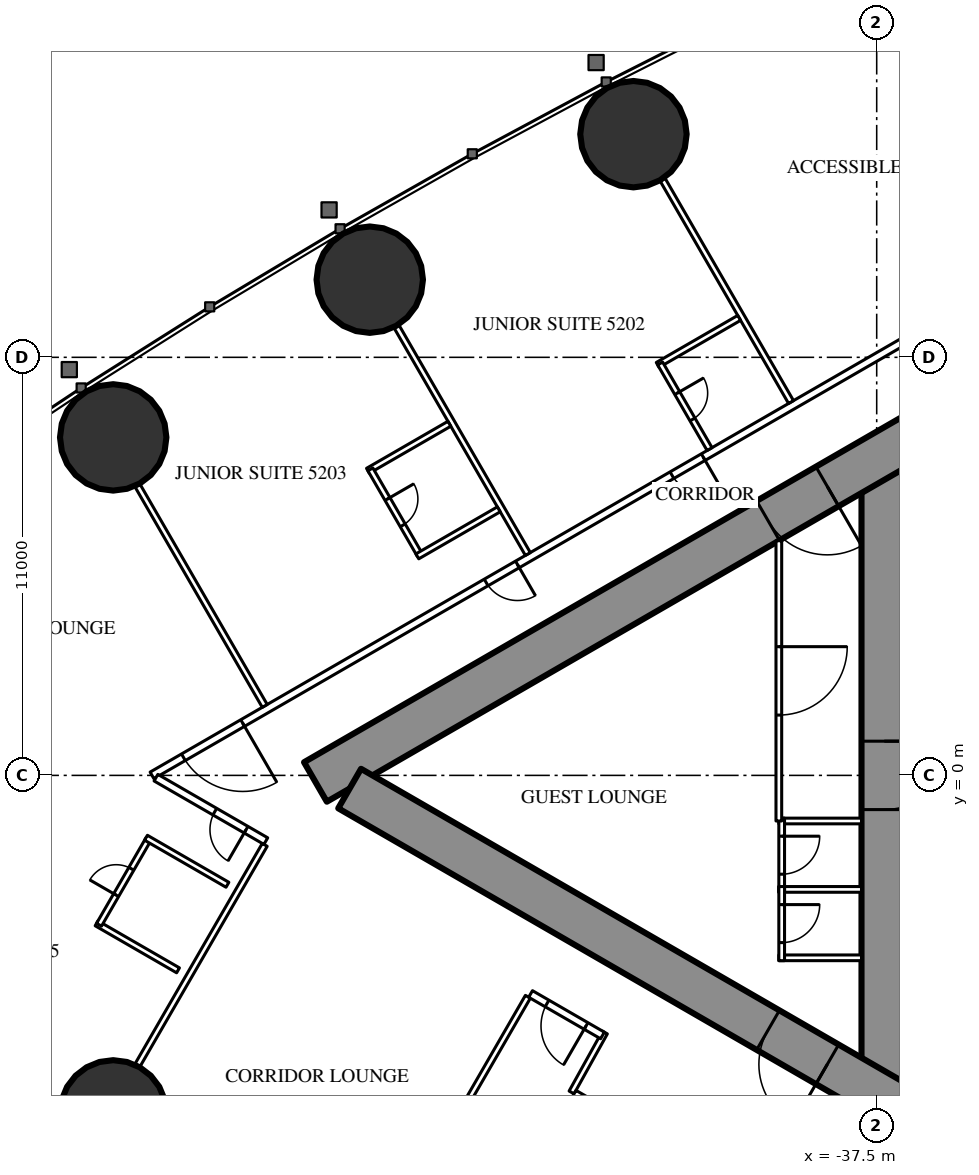
"""IFC4 building model, lengths in metres.
Left out: names, types, materials, properties, quantities, classifications, styles, units other than length and angle.
Written with IfcOpenShell. Run it as: python <this file> out.ifc"""

import sys

from ifc_helpers import new_model, si_unit, direction, frame, frame_2d, origin, origin_2d, place, context, subcontext, project, spatial, rectangle, circle, extrude, element, fill, save


model = new_model("IFC4")
c1 = context("Model", 3, precision=1e-05, world=origin(), true_north=direction((0.0, 1.0)))
c2 = subcontext(c1, "Body", "Model", "MODEL_VIEW")
j1 = project(units=[si_unit("LENGTHUNIT", "METRE"), si_unit("PLANEANGLEUNIT", "RADIAN")], contexts=[c1])
p1 = place(None, origin())
s1 = spatial("IfcSite", under=j1, at=p1, CompositionType="ELEMENT")
p2 = place(p1, origin())
s2 = spatial("IfcBuilding", under=s1, at=p2, CompositionType="ELEMENT")
p3 = place(p2, frame((0.0, 0.0, 194.8)))
s3 = spatial("IfcBuildingStorey", under=s2, at=p3, CompositionType="ELEMENT", Elevation=194.8)
for number, where, z_axis, x_axis in (
    (1, (-57.59, -8.893, 0.0), (0.0, 0.0, 1.0), (1.0, 0.0, 0.0)),
    (2, (-43.9, 16.871, 0.0), (0.0, 0.0, 1.0), (1.0, 0.0, 0.0)),
    (3, (-50.839, 13.043, 0.0), (0.0, 0.0, 1.0), (1.0, 0.0, 0.0)),
    (4, (-57.59, 8.893, 0.0), (0.0, 0.0, 1.0), (1.0, 0.0, 0.0)),
):
    element("IfcColumn", number, at=place(p3, frame(where, z_axis=z_axis, x_axis=x_axis)), inside=s3, PredefinedType="COLUMN", context=c2, shape_type="SweptSolid", body=[
        extrude(circle(Radius=1.4, at=origin_2d()), origin(), (0.0, 0.0, 1.0), 3.5),
    ])
p4 = place(p3, frame((-37.3, 8.6, 0.0), z_axis=(0.0, 0.0, 1.0), x_axis=(0.0, -1.0, 0.0)))
e5 = element("IfcWall", 5, at=p4, inside=s3, PredefinedType="SHEAR", context=c2, shape_type="SweptSolid", body=[
    extrude(rectangle(XDim=17.2, YDim=1.2, at=frame_2d((8.6, 0.0))), origin(), (0.0, 0.0, 1.0), 3.5),
])
p5 = place(p4, frame((7.7, 0.0, 0.0)))
e6 = element("IfcOpeningElement", 6, at=p5, cuts=e5, PredefinedType="OPENING", context=c2, shape_type="SweptSolid", body=[
    extrude(rectangle(XDim=1.8, YDim=2.2, at=frame_2d((0.9, 1.1))), frame((0.0, 0.61, 0.0), z_axis=(0.0, -1.0, 0.0), x_axis=(1.0, 0.0, 0.0)), (0.0, 0.0, 1.0), 1.22),
])
p6 = place(p3, frame((-27.2, 14.3, 0.0), z_axis=(0.0, 0.0, 1.0), x_axis=(-0.866026593062, -0.499997940104, 0.0)))
e7 = element("IfcWall", 7, at=p6, inside=s3, PredefinedType="SHEAR", context=c2, shape_type="SweptSolid", body=[
    extrude(rectangle(XDim=28.946, YDim=1.2, at=frame_2d((14.473, 0.0))), origin(), (0.0, 0.0, 1.0), 3.5),
])
p7 = place(p6, frame((4.6, 0.0, 0.0)))
e8 = element("IfcOpeningElement", 8, at=p7, cuts=e7, PredefinedType="OPENING", context=c2, shape_type="SweptSolid", body=[
    extrude(rectangle(XDim=1.0, YDim=2.2, at=frame_2d((0.5, 1.1))), frame((0.0, 0.61, 0.0), z_axis=(0.0, -1.0, 0.0), x_axis=(1.0, 0.0, 0.0)), (0.0, 0.0, 1.0), 1.22),
])
p8 = place(p6, frame((13.395, 0.0, 0.0)))
e9 = element("IfcOpeningElement", 9, at=p8, cuts=e7, PredefinedType="OPENING", context=c2, shape_type="SweptSolid", body=[
    extrude(rectangle(XDim=1.8, YDim=2.2, at=frame_2d((0.9, 1.1))), frame((0.0, 0.61, 0.0), z_axis=(0.0, -1.0, 0.0), x_axis=(1.0, 0.0, 0.0)), (0.0, 0.0, 1.0), 1.22),
])
p9 = place(p3, frame((-27.2, -14.3, 0.0), z_axis=(0.0, 0.0, 1.0), x_axis=(-0.866024021859, 0.500002393557, 0.0)))
e10 = element("IfcWall", 10, at=p9, inside=s3, PredefinedType="SHEAR", context=c2, shape_type="SweptSolid", body=[
    extrude(rectangle(XDim=27.907, YDim=1.2, at=frame_2d((13.954, 0.0))), origin(), (0.0, 0.0, 1.0), 3.5),
])
p10 = place(p9, frame((4.6, 0.0, 0.0)))
e11 = element("IfcOpeningElement", 11, at=p10, cuts=e10, PredefinedType="OPENING", context=c2, shape_type="SweptSolid", body=[
    extrude(rectangle(XDim=1.0, YDim=2.2, at=frame_2d((0.5, 1.1))), frame((0.0, 0.61, 0.0), z_axis=(0.0, -1.0, 0.0), x_axis=(1.0, 0.0, 0.0)), (0.0, 0.0, 1.0), 1.22),
])
p11 = place(p9, frame((13.395, 0.0, 0.0)))
e12 = element("IfcOpeningElement", 12, at=p11, cuts=e10, PredefinedType="OPENING", context=c2, shape_type="SweptSolid", body=[
    extrude(rectangle(XDim=1.8, YDim=2.2, at=frame_2d((0.9, 1.1))), frame((0.0, 0.61, 0.0), z_axis=(0.0, -1.0, 0.0), x_axis=(1.0, 0.0, 0.0)), (0.0, 0.0, 1.0), 1.22),
])
p12 = place(p3, frame((-27.86, 16.575, 0.0), z_axis=(0.0, 0.0, 1.0), x_axis=(-0.866025533911, -0.499999774615, 0.0)))
e13 = element("IfcWall", 13, at=p12, inside=s3, PredefinedType="PARTITIONING", context=c2, shape_type="SweptSolid", body=[
    extrude(rectangle(XDim=33.149, YDim=0.2, at=frame_2d((16.575, 0.0))), origin(), (0.0, 0.0, 1.0), 3.25),
])
p13 = place(p12, frame((3.75, 0.0, 0.0)))
e14 = element("IfcOpeningElement", 14, at=p13, cuts=e13, PredefinedType="OPENING", context=c2, shape_type="SweptSolid", body=[
    extrude(rectangle(XDim=1.0, YDim=2.2, at=frame_2d((0.5, 1.1))), frame((0.0, 0.11, 0.0), z_axis=(0.0, -1.0, 0.0), x_axis=(1.0, 0.0, 0.0)), (0.0, 0.0, 1.0), 0.22),
])
p14 = place(p12, frame((16.402, 0.0, 0.0)))
e15 = element("IfcOpeningElement", 15, at=p14, cuts=e13, PredefinedType="OPENING", context=c2, shape_type="SweptSolid", body=[
    extrude(rectangle(XDim=0.95, YDim=2.2, at=frame_2d((0.475, 1.1))), frame((0.0, 0.11, 0.0), z_axis=(0.0, -1.0, 0.0), x_axis=(1.0, 0.0, 0.0)), (0.0, 0.0, 1.0), 0.22),
])
p15 = place(p12, frame((22.047, 0.0, 0.0)))
e16 = element("IfcOpeningElement", 16, at=p15, cuts=e13, PredefinedType="OPENING", context=c2, shape_type="SweptSolid", body=[
    extrude(rectangle(XDim=0.95, YDim=2.2, at=frame_2d((0.475, 1.1))), frame((0.0, 0.11, 0.0), z_axis=(0.0, -1.0, 0.0), x_axis=(1.0, 0.0, 0.0)), (0.0, 0.0, 1.0), 0.22),
])
p16 = place(p12, frame((30.396, 0.0, 0.0)))
e17 = element("IfcOpeningElement", 17, at=p16, cuts=e13, PredefinedType="OPENING", context=c2, shape_type="SweptSolid", body=[
    extrude(rectangle(XDim=1.8, YDim=2.2, at=frame_2d((0.9, 1.1))), frame((0.0, 0.11, 0.0), z_axis=(0.0, -1.0, 0.0), x_axis=(1.0, 0.0, 0.0)), (0.0, 0.0, 1.0), 0.22),
])
p17 = place(p3, frame((-39.754, 9.823, 0.0), z_axis=(0.0, 0.0, 1.0), x_axis=(-0.499997670926, 0.866026748472, 0.0)))
e18 = element("IfcWall", 18, at=p17, inside=s3, PredefinedType="PARTITIONING", context=c2, shape_type="SweptSolid", body=[
    extrude(rectangle(XDim=6.757, YDim=0.15, at=frame_2d((3.379, 0.0))), origin(), (0.0, 0.0, 1.0), 2.3),
])
p18 = place(p3, frame((-46.679, 5.825, 0.0), z_axis=(0.0, 0.0, 1.0), x_axis=(-0.500006839597, 0.866021454905, 0.0)))
e19 = element("IfcWall", 19, at=p18, inside=s3, PredefinedType="PARTITIONING", context=c2, shape_type="SweptSolid", body=[
    extrude(rectangle(XDim=6.911, YDim=0.15, at=frame_2d((3.456, 0.0))), origin(), (0.0, 0.0, 1.0), 2.3),
])
p19 = place(p3, frame((-53.602, 1.828, 0.0), z_axis=(0.0, 0.0, 1.0), x_axis=(-0.49999191814, 0.866030069798, 0.0)))
e20 = element("IfcWall", 20, at=p19, inside=s3, PredefinedType="PARTITIONING", context=c2, shape_type="SweptSolid", body=[
    extrude(rectangle(XDim=6.692, YDim=0.15, at=frame_2d((3.346, 0.0))), origin(), (0.0, 0.0, 1.0), 2.3),
])
p20 = place(p3, frame((-46.679, -5.825, 0.0), z_axis=(0.0, 0.0, 1.0), x_axis=(-0.500006839597, -0.866021454905, 0.0)))
e21 = element("IfcWall", 21, at=p20, inside=s3, PredefinedType="PARTITIONING", context=c2, shape_type="SweptSolid", body=[
    extrude(rectangle(XDim=6.911, YDim=0.15, at=frame_2d((3.456, 0.0))), origin(), (0.0, 0.0, 1.0), 2.3),
])
p21 = place(p3, frame((-53.602, -1.828, 0.0), z_axis=(0.0, 0.0, 1.0), x_axis=(-0.49999191814, -0.866030069798, 0.0)))
e22 = element("IfcWall", 22, at=p21, inside=s3, PredefinedType="PARTITIONING", context=c2, shape_type="SweptSolid", body=[
    extrude(rectangle(XDim=6.692, YDim=0.15, at=frame_2d((3.346, 0.0))), origin(), (0.0, 0.0, 1.0), 2.3),
])
p22 = place(p3, frame((-44.652, -6.764, 0.0), z_axis=(0.0, 0.0, 1.0), x_axis=(-0.485424724123, -0.874278466629, 0.0)))
e23 = element("IfcWall", 23, at=p22, inside=s3, PredefinedType="PARTITIONING", context=c2, shape_type="SweptSolid", body=[
    extrude(rectangle(XDim=1.805, YDim=0.15, at=frame_2d((0.903, 0.0))), origin(), (0.0, 0.0, 1.0), 3.25),
])
p23 = place(p3, frame((-44.715, -6.844, 0.0), z_axis=(0.0, 0.0, 1.0), x_axis=(-0.865999496279, 0.500044870432, 0.0)))
e24 = element("IfcWall", 24, at=p23, inside=s3, PredefinedType="PARTITIONING", context=c2, shape_type="SweptSolid", body=[
    extrude(rectangle(XDim=2.185, YDim=0.2, at=frame_2d((1.092, 0.0))), origin(), (0.0, 0.0, 1.0), 3.25),
])
p24 = place(p23, frame((0.5, 0.0, 0.0)))
e25 = element("IfcOpeningElement", 25, at=p24, cuts=e24, PredefinedType="OPENING", context=c2, shape_type="SweptSolid", body=[
    extrude(rectangle(XDim=1.185, YDim=2.2, at=frame_2d((0.593, 1.1))), frame((0.0, 0.11, 0.0), z_axis=(0.0, -1.0, 0.0), x_axis=(1.0, 0.0, 0.0)), (0.0, 0.0, 1.0), 0.22),
])
p25 = place(p3, frame((-53.574, -1.729, 0.0), z_axis=(0.0, 0.0, 1.0), x_axis=(-0.866019930389, 0.500009480079, 0.0)))
e26 = element("IfcWall", 26, at=p25, inside=s3, PredefinedType="PARTITIONING", context=c2, shape_type="SweptSolid", body=[
    extrude(rectangle(XDim=3.338, YDim=0.2, at=frame_2d((1.669, 0.0))), origin(), (0.0, 0.0, 1.0), 3.25),
])
p26 = place(p25, frame((0.6, 0.0, 0.0)))
e27 = element("IfcOpeningElement", 27, at=p26, cuts=e26, PredefinedType="OPENING", context=c2, shape_type="SweptSolid", body=[
    extrude(rectangle(XDim=0.95, YDim=2.2, at=frame_2d((0.475, 1.1))), frame((0.0, 0.11, 0.0), z_axis=(0.0, -1.0, 0.0), x_axis=(1.0, 0.0, 0.0)), (0.0, 0.0, 1.0), 0.22),
])
p27 = place(p3, frame((-41.119, 12.037, 0.0), z_axis=(0.0, 0.0, 1.0), x_axis=(-0.866073894602, -0.499916002032, 0.0)))
e28 = element("IfcWall", 28, at=p27, inside=s3, PredefinedType="PARTITIONING", context=c2, shape_type="SweptSolid", body=[
    extrude(rectangle(XDim=2.475, YDim=0.15, at=frame_2d((1.238, 0.0))), origin(), (0.0, 0.0, 1.0), 3.25),
])
p28 = place(p3, frame((-41.898, 8.585, 0.0), z_axis=(0.0, 0.0, 1.0), x_axis=(-0.500006934395, 0.866021400173, 0.0)))
e29 = element("IfcWall", 29, at=p28, inside=s3, PredefinedType="PARTITIONING", context=c2, shape_type="SweptSolid", body=[
    extrude(rectangle(XDim=2.6, YDim=0.15, at=frame_2d((1.3, 0.0))), origin(), (0.0, 0.0, 1.0), 3.25),
])
p29 = place(p28, frame((0.9, 0.0, 0.0)))
e30 = element("IfcOpeningElement", 30, at=p29, cuts=e29, PredefinedType="OPENING", context=c2, shape_type="SweptSolid", body=[
    extrude(rectangle(XDim=0.8, YDim=2.2, at=frame_2d((0.4, 1.1))), frame((0.0, 0.085, 0.0), z_axis=(0.0, -1.0, 0.0), x_axis=(1.0, 0.0, 0.0)), (0.0, 0.0, 1.0), 0.17),
])
p30 = place(p3, frame((-48.744, 9.252, 0.0), z_axis=(0.0, 0.0, 1.0), x_axis=(-0.866006523861, -0.500032699561, 0.0)))
e31 = element("IfcWall", 31, at=p30, inside=s3, PredefinedType="PARTITIONING", context=c2, shape_type="SweptSolid", body=[
    extrude(rectangle(XDim=2.475, YDim=0.15, at=frame_2d((1.237, 0.0))), origin(), (0.0, 0.0, 1.0), 3.25),
])
p31 = place(p3, frame((-49.522, 5.8, 0.0), z_axis=(0.0, 0.0, 1.0), x_axis=(-0.500006934395, 0.866021400173, 0.0)))
e32 = element("IfcWall", 32, at=p31, inside=s3, PredefinedType="PARTITIONING", context=c2, shape_type="SweptSolid", body=[
    extrude(rectangle(XDim=2.6, YDim=0.15, at=frame_2d((1.3, 0.0))), origin(), (0.0, 0.0, 1.0), 3.25),
])
p32 = place(p31, frame((0.9, 0.0, 0.0)))
e33 = element("IfcOpeningElement", 33, at=p32, cuts=e32, PredefinedType="OPENING", context=c2, shape_type="SweptSolid", body=[
    extrude(rectangle(XDim=0.8, YDim=2.2, at=frame_2d((0.4, 1.1))), frame((0.0, 0.085, 0.0), z_axis=(0.0, -1.0, 0.0), x_axis=(1.0, 0.0, 0.0)), (0.0, 0.0, 1.0), 0.17),
])
for number, where, z_axis, x_axis in (
    (34, (-47.444, 7.0, 0.0), (0.0, 0.0, 1.0), (-0.866, -0.5, 0.0)),
    (35, (-55.884, -5.13, 0.0), (0.0, 0.0, 1.0), (-0.866, 0.5, 0.0)),
):
    element("IfcWall", number, at=place(p3, frame(where, z_axis=z_axis, x_axis=x_axis)), inside=s3, PredefinedType="PARTITIONING", context=c2, shape_type="SweptSolid", body=[
        extrude(rectangle(XDim=2.475, YDim=0.15, at=frame_2d((1.237, 0.0))), origin(), (0.0, 0.0, 1.0), 3.25),
    ])
p33 = place(p3, frame((-56.662, -1.678, 0.0), z_axis=(0.0, 0.0, 1.0), x_axis=(-0.500006934395, -0.866021400173, 0.0)))
e36 = element("IfcWall", 36, at=p33, inside=s3, PredefinedType="PARTITIONING", context=c2, shape_type="SweptSolid", body=[
    extrude(rectangle(XDim=2.6, YDim=0.15, at=frame_2d((1.3, 0.0))), origin(), (0.0, 0.0, 1.0), 3.25),
])
p34 = place(p33, frame((0.9, 0.0, 0.0)))
e37 = element("IfcOpeningElement", 37, at=p34, cuts=e36, PredefinedType="OPENING", context=c2, shape_type="SweptSolid", body=[
    extrude(rectangle(XDim=0.8, YDim=2.2, at=frame_2d((0.4, 1.1))), frame((0.0, 0.085, 0.0), z_axis=(0.0, -1.0, 0.0), x_axis=(1.0, 0.0, 0.0)), (0.0, 0.0, 1.0), 0.17),
])
p35 = place(p3, frame((-54.583, -2.878, 0.0), z_axis=(0.0, 0.0, 1.0), x_axis=(-0.866006523861, 0.500032699561, 0.0)))
e38 = element("IfcWall", 38, at=p35, inside=s3, PredefinedType="PARTITIONING", context=c2, shape_type="SweptSolid", body=[
    extrude(rectangle(XDim=2.475, YDim=0.15, at=frame_2d((1.237, 0.0))), origin(), (0.0, 0.0, 1.0), 3.25),
])
for number, where, z_axis, x_axis in (
    (39, (-37.9, -1.2, 0.0), (0.0, 0.0, 1.0), (-1.0, 0.0, 0.0)),
    (40, (-37.9, -3.0, 0.0), (0.0, 0.0, 1.0), (-1.0, 0.0, 0.0)),
    (41, (-37.9, -4.8, 0.0), (0.0, 0.0, 1.0), (-1.0, 0.0, 0.0)),
):
    element("IfcWall", number, at=place(p3, frame(where, z_axis=z_axis, x_axis=x_axis)), inside=s3, PredefinedType="PARTITIONING", context=c2, shape_type="SweptSolid", body=[
        extrude(rectangle(XDim=2.175, YDim=0.15, at=frame_2d((1.087, 0.0))), origin(), (0.0, 0.0, 1.0), 3.25),
    ])
p36 = place(p3, frame((-40.0, -1.125, 0.0), z_axis=(0.0, 0.0, 1.0), x_axis=(0.0, -1.0, 0.0)))
e42 = element("IfcWall", 42, at=p36, inside=s3, PredefinedType="PARTITIONING", context=c2, shape_type="SweptSolid", body=[
    extrude(rectangle(XDim=1.95, YDim=0.15, at=frame_2d((0.975, 0.0))), origin(), (0.0, 0.0, 1.0), 3.25),
])
p37 = place(p36, frame((0.475, 0.0, 0.0)))
e43 = element("IfcOpeningElement", 43, at=p37, cuts=e42, PredefinedType="OPENING", context=c2, shape_type="SweptSolid", body=[
    extrude(rectangle(XDim=1.0, YDim=2.2, at=frame_2d((0.5, 1.1))), frame((0.0, 0.085, 0.0), z_axis=(0.0, -1.0, 0.0), x_axis=(1.0, 0.0, 0.0)), (0.0, 0.0, 1.0), 0.17),
])
p38 = place(p3, frame((-40.0, -2.925, 0.0), z_axis=(0.0, 0.0, 1.0), x_axis=(0.0, -1.0, 0.0)))
e44 = element("IfcWall", 44, at=p38, inside=s3, PredefinedType="PARTITIONING", context=c2, shape_type="SweptSolid", body=[
    extrude(rectangle(XDim=1.95, YDim=0.15, at=frame_2d((0.975, 0.0))), origin(), (0.0, 0.0, 1.0), 3.25),
])
p39 = place(p38, frame((0.475, 0.0, 0.0)))
e45 = element("IfcOpeningElement", 45, at=p39, cuts=e44, PredefinedType="OPENING", context=c2, shape_type="SweptSolid", body=[
    extrude(rectangle(XDim=1.0, YDim=2.2, at=frame_2d((0.5, 1.1))), frame((0.0, 0.085, 0.0), z_axis=(0.0, -1.0, 0.0), x_axis=(1.0, 0.0, 0.0)), (0.0, 0.0, 1.0), 0.17),
])
p40 = place(p3, frame((-40.075, 6.174, 0.0), z_axis=(0.0, 0.0, 1.0), x_axis=(0.0, -1.0, 0.0)))
e46 = element("IfcWall", 46, at=p40, inside=s3, PredefinedType="PARTITIONING", context=c2, shape_type="SweptSolid", body=[
    extrude(rectangle(XDim=7.374, YDim=0.15, at=frame_2d((3.687, 0.0))), origin(), (0.0, 0.0, 1.0), 3.25),
])
p41 = place(p40, frame((2.787, 0.0, 0.0)))
e47 = element("IfcOpeningElement", 47, at=p41, cuts=e46, PredefinedType="OPENING", context=c2, shape_type="SweptSolid", body=[
    extrude(rectangle(XDim=1.8, YDim=2.2, at=frame_2d((0.9, 1.1))), frame((0.0, 0.085, 0.0), z_axis=(0.0, -1.0, 0.0), x_axis=(1.0, 0.0, 0.0)), (0.0, 0.0, 1.0), 0.17),
])
p42 = place(p3, frame((-39.758, -11.697, 0.0), z_axis=(0.0, 0.0, 1.0), x_axis=(-0.866024194504, 0.500002094529, 0.0)))
e48 = element("IfcWall", 48, at=p42, inside=s3, PredefinedType="PARTITIONING", context=c2, shape_type="SweptSolid", body=[
    extrude(rectangle(XDim=6.6, YDim=0.25, at=frame_2d((3.3, 0.0))), origin(), (0.0, 0.0, 1.0), 3.25),
])
p43 = place(p42, frame((0.75, 0.0, 0.0)))
e49 = element("IfcOpeningElement", 49, at=p43, cuts=e48, PredefinedType="OPENING", context=c2, shape_type="SweptSolid", body=[
    extrude(rectangle(XDim=1.1, YDim=2.2, at=frame_2d((0.55, 1.1))), frame((0.0, 0.135, 0.0), z_axis=(0.0, -1.0, 0.0), x_axis=(1.0, 0.0, 0.0)), (0.0, 0.0, 1.0), 0.27),
])
p44 = place(p42, frame((2.75, 0.0, 0.0)))
e50 = element("IfcOpeningElement", 50, at=p44, cuts=e48, PredefinedType="OPENING", context=c2, shape_type="SweptSolid", body=[
    extrude(rectangle(XDim=1.1, YDim=2.2, at=frame_2d((0.55, 1.1))), frame((0.0, 0.135, 0.0), z_axis=(0.0, -1.0, 0.0), x_axis=(1.0, 0.0, 0.0)), (0.0, 0.0, 1.0), 0.27),
])
p45 = place(p42, frame((4.75, 0.0, 0.0)))
e51 = element("IfcOpeningElement", 51, at=p45, cuts=e48, PredefinedType="OPENING", context=c2, shape_type="SweptSolid", body=[
    extrude(rectangle(XDim=1.1, YDim=2.2, at=frame_2d((0.55, 1.1))), frame((0.0, 0.135, 0.0), z_axis=(0.0, -1.0, 0.0), x_axis=(1.0, 0.0, 0.0)), (0.0, 0.0, 1.0), 0.27),
])
p46 = place(p29, origin())
e52 = element("IfcDoor", 52, at=p46, inside=s3, OperationType="SINGLE_SWING_RIGHT", PredefinedType="DOOR", context=c2, shape_type="SweptSolid", body=[
    extrude(rectangle(XDim=0.8, YDim=2.2, at=frame_2d((0.4, 1.1))), frame((0.0, 0.025, 0.0), z_axis=(0.0, -1.0, 0.0), x_axis=(1.0, 0.0, 0.0)), (0.0, 0.0, 1.0), 0.05),
])
fill(e30, e52)
p47 = place(p14, origin())
e53 = element("IfcDoor", 53, at=p47, inside=s3, OperationType="SINGLE_SWING_LEFT", PredefinedType="DOOR", context=c2, shape_type="SweptSolid", body=[
    extrude(rectangle(XDim=0.95, YDim=2.2, at=frame_2d((0.475, 1.1))), frame((0.0, 0.025, 0.0), z_axis=(0.0, -1.0, 0.0), x_axis=(1.0, 0.0, 0.0)), (0.0, 0.0, 1.0), 0.05),
])
fill(e15, e53)
p48 = place(p32, origin())
e54 = element("IfcDoor", 54, at=p48, inside=s3, OperationType="SINGLE_SWING_RIGHT", PredefinedType="DOOR", context=c2, shape_type="SweptSolid", body=[
    extrude(rectangle(XDim=0.8, YDim=2.2, at=frame_2d((0.4, 1.1))), frame((0.0, 0.025, 0.0), z_axis=(0.0, -1.0, 0.0), x_axis=(1.0, 0.0, 0.0)), (0.0, 0.0, 1.0), 0.05),
])
fill(e33, e54)
p49 = place(p15, origin())
e55 = element("IfcDoor", 55, at=p49, inside=s3, OperationType="SINGLE_SWING_LEFT", PredefinedType="DOOR", context=c2, shape_type="SweptSolid", body=[
    extrude(rectangle(XDim=0.95, YDim=2.2, at=frame_2d((0.475, 1.1))), frame((0.0, 0.025, 0.0), z_axis=(0.0, -1.0, 0.0), x_axis=(1.0, 0.0, 0.0)), (0.0, 0.0, 1.0), 0.05),
])
fill(e16, e55)
p50 = place(p16, origin())
e56 = element("IfcDoor", 56, at=p50, inside=s3, OperationType="DOUBLE_DOOR_SINGLE_SWING", PredefinedType="DOOR", context=c2, shape_type="SweptSolid", body=[
    extrude(rectangle(XDim=1.8, YDim=2.2, at=frame_2d((0.9, 1.1))), frame((0.0, 0.025, 0.0), z_axis=(0.0, -1.0, 0.0), x_axis=(1.0, 0.0, 0.0)), (0.0, 0.0, 1.0), 0.05),
])
fill(e17, e56)
p51 = place(p34, origin())
e57 = element("IfcDoor", 57, at=p51, inside=s3, OperationType="SINGLE_SWING_RIGHT", PredefinedType="DOOR", context=c2, shape_type="SweptSolid", body=[
    extrude(rectangle(XDim=0.8, YDim=2.2, at=frame_2d((0.4, 1.1))), frame((0.0, 0.025, 0.0), z_axis=(0.0, -1.0, 0.0), x_axis=(1.0, 0.0, 0.0)), (0.0, 0.0, 1.0), 0.05),
])
fill(e37, e57)
p52 = place(p26, origin())
e58 = element("IfcDoor", 58, at=p52, inside=s3, OperationType="SINGLE_SWING_LEFT", PredefinedType="DOOR", context=c2, shape_type="SweptSolid", body=[
    extrude(rectangle(XDim=0.95, YDim=2.2, at=frame_2d((0.475, 1.1))), frame((0.0, 0.025, 0.0), z_axis=(0.0, -1.0, 0.0), x_axis=(1.0, 0.0, 0.0)), (0.0, 0.0, 1.0), 0.05),
])
fill(e27, e58)
p53 = place(p24, origin())
e59 = element("IfcDoor", 59, at=p53, inside=s3, OperationType="SINGLE_SWING_LEFT", PredefinedType="DOOR", context=c2, shape_type="SweptSolid", body=[
    extrude(rectangle(XDim=1.185, YDim=2.2, at=frame_2d((0.593, 1.1))), frame((0.0, 0.025, 0.0), z_axis=(0.0, -1.0, 0.0), x_axis=(1.0, 0.0, 0.0)), (0.0, 0.0, 1.0), 0.05),
])
fill(e25, e59)
p54 = place(p37, origin())
e60 = element("IfcDoor", 60, at=p54, inside=s3, OperationType="SINGLE_SWING_LEFT", PredefinedType="DOOR", context=c2, shape_type="SweptSolid", body=[
    extrude(rectangle(XDim=1.0, YDim=2.2, at=frame_2d((0.5, 1.1))), frame((0.0, 0.025, 0.0), z_axis=(0.0, -1.0, 0.0), x_axis=(1.0, 0.0, 0.0)), (0.0, 0.0, 1.0), 0.05),
])
fill(e43, e60)
p55 = place(p39, origin())
e61 = element("IfcDoor", 61, at=p55, inside=s3, OperationType="SINGLE_SWING_LEFT", PredefinedType="DOOR", context=c2, shape_type="SweptSolid", body=[
    extrude(rectangle(XDim=1.0, YDim=2.2, at=frame_2d((0.5, 1.1))), frame((0.0, 0.025, 0.0), z_axis=(0.0, -1.0, 0.0), x_axis=(1.0, 0.0, 0.0)), (0.0, 0.0, 1.0), 0.05),
])
fill(e45, e61)
p56 = place(p41, origin())
e62 = element("IfcDoor", 62, at=p56, inside=s3, OperationType="DOUBLE_DOOR_SINGLE_SWING", PredefinedType="DOOR", context=c2, shape_type="SweptSolid", body=[
    extrude(rectangle(XDim=1.8, YDim=2.2, at=frame_2d((0.9, 1.1))), frame((0.0, 0.025, 0.0), z_axis=(0.0, -1.0, 0.0), x_axis=(1.0, 0.0, 0.0)), (0.0, 0.0, 1.0), 0.05),
])
fill(e47, e62)
p57 = place(p8, origin())
e63 = element("IfcDoor", 63, at=p57, inside=s3, OperationType="DOUBLE_DOOR_SINGLE_SWING", PredefinedType="DOOR", context=c2, shape_type="SweptSolid", body=[
    extrude(rectangle(XDim=1.8, YDim=2.2, at=frame_2d((0.9, 1.1))), frame((0.0, 0.025, 0.0), z_axis=(0.0, -1.0, 0.0), x_axis=(1.0, 0.0, 0.0)), (0.0, 0.0, 1.0), 0.05),
])
fill(e9, e63)
p58 = place(p11, origin())
e64 = element("IfcDoor", 64, at=p58, inside=s3, OperationType="DOUBLE_DOOR_SINGLE_SWING", PredefinedType="DOOR", context=c2, shape_type="SweptSolid", body=[
    extrude(rectangle(XDim=1.8, YDim=2.2, at=frame_2d((0.9, 1.1))), frame((0.0, 0.025, 0.0), z_axis=(0.0, -1.0, 0.0), x_axis=(1.0, 0.0, 0.0)), (0.0, 0.0, 1.0), 0.05),
])
fill(e12, e64)
p59 = place(p5, origin())
e65 = element("IfcDoor", 65, at=p59, inside=s3, OperationType="DOUBLE_DOOR_SINGLE_SWING", PredefinedType="DOOR", context=c2, shape_type="SweptSolid", body=[
    extrude(rectangle(XDim=1.8, YDim=2.2, at=frame_2d((0.9, 1.1))), frame((0.0, 0.025, 0.0), z_axis=(0.0, -1.0, 0.0), x_axis=(1.0, 0.0, 0.0)), (0.0, 0.0, 1.0), 0.05),
])
fill(e6, e65)
save(model, sys.argv[1])
